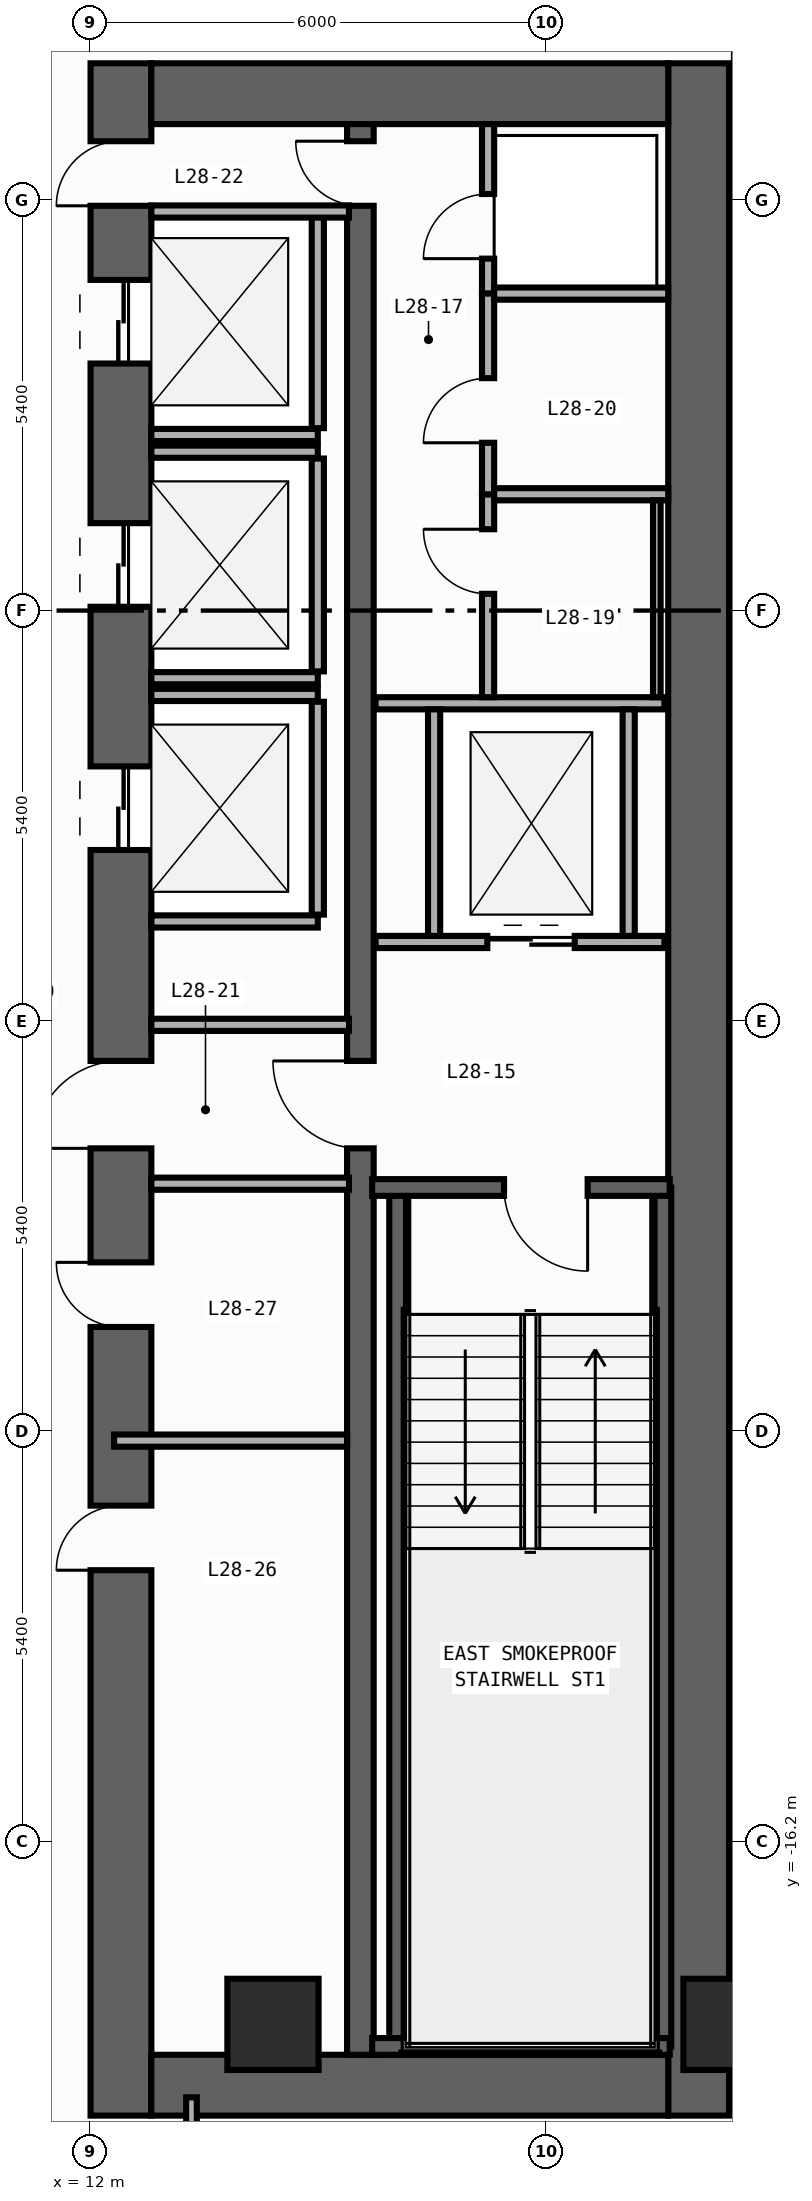
"""IFC4 building model, lengths in metres.
Left out: names, types, materials, properties, quantities, classifications, styles, units other than length and angle.
Written with IfcOpenShell. Run it as: python <this file> out.ifc"""

import sys

from ifc_helpers import new_model, si_unit, direction, frame, frame_2d, origin, origin_2d, place, context, subcontext, project, spatial, rectangle, extrude, element, fill, save


model = new_model("IFC4")
c1 = context("Model", 3, precision=1e-05, world=origin(), true_north=direction((0.0, 1.0)))
c2 = subcontext(c1, "Body", "Model", "MODEL_VIEW")
j1 = project(units=[si_unit("LENGTHUNIT", "METRE"), si_unit("PLANEANGLEUNIT", "RADIAN")], contexts=[c1])
p1 = place(None, origin())
s1 = spatial("IfcSite", under=j1, at=p1, CompositionType="ELEMENT")
p2 = place(p1, origin())
s2 = spatial("IfcBuilding", under=s1, at=p2, CompositionType="ELEMENT")
p3 = place(p2, frame((0.0, 0.0, 122.6)))
s3 = spatial("IfcBuildingStorey", under=s2, at=p3, CompositionType="ELEMENT", Elevation=122.6)
p4 = place(p3, frame((12.4, -19.8, 0.0), z_axis=(0.0, 0.0, 1.0), x_axis=(0.0, 1.0, 0.0)))
e1 = element("IfcWall", 1, at=p4, inside=s3, PredefinedType="SHEAR", context=c2, shape_type="SweptSolid", body=[
    extrude(rectangle(XDim=27.0, YDim=0.8, at=frame_2d((13.5, 0.0))), origin(), (0.0, 0.0, 1.0), 3.94),
])
p5 = place(p4, frame((23.05, 0.0, 0.0)))
e2 = element("IfcOpeningElement", 2, at=p5, cuts=e1, PredefinedType="OPENING", context=c2, shape_type="SweptSolid", body=[
    extrude(rectangle(XDim=1.1, YDim=2.2, at=frame_2d((0.55, 1.1))), frame((0.0, 0.41, 0.0), z_axis=(0.0, -1.0, 0.0), x_axis=(1.0, 0.0, 0.0)), (0.0, 0.0, 1.0), 0.82),
])
p6 = place(p4, frame((19.85, 0.0, 0.0)))
e3 = element("IfcOpeningElement", 3, at=p6, cuts=e1, PredefinedType="OPENING", context=c2, shape_type="SweptSolid", body=[
    extrude(rectangle(XDim=1.1, YDim=2.2, at=frame_2d((0.55, 1.1))), frame((0.0, 0.41, 0.0), z_axis=(0.0, -1.0, 0.0), x_axis=(1.0, 0.0, 0.0)), (0.0, 0.0, 1.0), 0.82),
])
p7 = place(p4, frame((16.65, 0.0, 0.0)))
e4 = element("IfcOpeningElement", 4, at=p7, cuts=e1, PredefinedType="OPENING", context=c2, shape_type="SweptSolid", body=[
    extrude(rectangle(XDim=1.1, YDim=2.2, at=frame_2d((0.55, 1.1))), frame((0.0, 0.41, 0.0), z_axis=(0.0, -1.0, 0.0), x_axis=(1.0, 0.0, 0.0)), (0.0, 0.0, 1.0), 0.82),
])
p8 = place(p4, frame((7.175, 0.0, 0.0)))
e5 = element("IfcOpeningElement", 5, at=p8, cuts=e1, PredefinedType="OPENING", context=c2, shape_type="SweptSolid", body=[
    extrude(rectangle(XDim=0.85, YDim=2.1, at=frame_2d((0.425, 1.05))), frame((0.0, 0.41, 0.0), z_axis=(0.0, -1.0, 0.0), x_axis=(1.0, 0.0, 0.0)), (0.0, 0.0, 1.0), 0.82),
])
p9 = place(p4, frame((10.375, 0.0, 0.0)))
e6 = element("IfcOpeningElement", 6, at=p9, cuts=e1, PredefinedType="OPENING", context=c2, shape_type="SweptSolid", body=[
    extrude(rectangle(XDim=0.85, YDim=2.1, at=frame_2d((0.425, 1.05))), frame((0.0, 0.41, 0.0), z_axis=(0.0, -1.0, 0.0), x_axis=(1.0, 0.0, 0.0)), (0.0, 0.0, 1.0), 0.82),
])
p10 = place(p4, frame((12.725, 0.0, 0.0)))
e7 = element("IfcOpeningElement", 7, at=p10, cuts=e1, PredefinedType="OPENING", context=c2, shape_type="SweptSolid", body=[
    extrude(rectangle(XDim=1.15, YDim=2.2, at=frame_2d((0.575, 1.1))), frame((0.0, 0.41, 0.0), z_axis=(0.0, -1.0, 0.0), x_axis=(1.0, 0.0, 0.0)), (0.0, 0.0, 1.0), 0.82),
])
p11 = place(p4, frame((25.125, 0.0, 0.0)))
e8 = element("IfcOpeningElement", 8, at=p11, cuts=e1, PredefinedType="OPENING", context=c2, shape_type="SweptSolid", body=[
    extrude(rectangle(XDim=0.85, YDim=2.1, at=frame_2d((0.425, 1.05))), frame((0.0, 0.41, 0.0), z_axis=(0.0, -1.0, 0.0), x_axis=(1.0, 0.0, 0.0)), (0.0, 0.0, 1.0), 0.82),
])
p12 = place(p3, frame((20.0, -19.8, 0.0), z_axis=(0.0, 0.0, 1.0), x_axis=(0.0, 1.0, 0.0)))
e9 = element("IfcWall", 9, at=p12, inside=s3, PredefinedType="SHEAR", context=c2, shape_type="SweptSolid", body=[
    extrude(rectangle(XDim=27.0, YDim=0.8, at=frame_2d((13.5, 0.0))), origin(), (0.0, 0.0, 1.0), 3.94),
])
for number, where, z_axis, x_axis in (
    (10, (12.8, -19.4, 0.0), (0.0, 0.0, 1.0), (1.0, 0.0, 0.0)),
    (11, (12.8, 6.8, 0.0), (0.0, 0.0, 1.0), (1.0, 0.0, 0.0)),
):
    element("IfcWall", number, at=place(p3, frame(where, z_axis=z_axis, x_axis=x_axis)), inside=s3, PredefinedType="SHEAR", context=c2, shape_type="SweptSolid", body=[
        extrude(rectangle(XDim=6.8, YDim=0.8, at=frame_2d((3.4, 0.0))), origin(), (0.0, 0.0, 1.0), 3.94),
    ])
p13 = place(p3, frame((15.55, -19.0, 0.0), z_axis=(0.0, 0.0, 1.0), x_axis=(0.0, 1.0, 0.0)))
e12 = element("IfcWall", 12, at=p13, inside=s3, PredefinedType="SHEAR", context=c2, shape_type="SweptSolid", body=[
    extrude(rectangle(XDim=25.4, YDim=0.35, at=frame_2d((12.7, 0.0))), origin(), (0.0, 0.0, 1.0), 3.94),
])
p14 = place(p13, frame((11.925, 0.0, 0.0)))
e13 = element("IfcOpeningElement", 13, at=p14, cuts=e12, PredefinedType="OPENING", context=c2, shape_type="SweptSolid", body=[
    extrude(rectangle(XDim=1.15, YDim=2.2, at=frame_2d((0.575, 1.1))), frame((0.0, 0.185, 0.0), z_axis=(0.0, -1.0, 0.0), x_axis=(1.0, 0.0, 0.0)), (0.0, 0.0, 1.0), 0.37),
])
p15 = place(p13, frame((24.325, 0.0, 0.0)))
e14 = element("IfcOpeningElement", 14, at=p15, cuts=e12, PredefinedType="OPENING", context=c2, shape_type="SweptSolid", body=[
    extrude(rectangle(XDim=0.85, YDim=2.1, at=frame_2d((0.425, 1.05))), frame((0.0, 0.185, 0.0), z_axis=(0.0, -1.0, 0.0), x_axis=(1.0, 0.0, 0.0)), (0.0, 0.0, 1.0), 0.37),
])
for number, where, z_axis, x_axis in (
    (15, (16.04, -18.89, 0.0), (0.0, 0.0, 1.0), (0.0, 1.0, 0.0)),
    (16, (19.53, -18.89, 0.0), (0.0, 0.0, 1.0), (0.0, 1.0, 0.0)),
):
    element("IfcWall", number, at=place(p3, frame(where, z_axis=z_axis, x_axis=x_axis)), inside=s3, PredefinedType="SHEAR", context=c2, shape_type="SweptSolid", body=[
        extrude(rectangle(XDim=11.3, YDim=0.22, at=frame_2d((5.65, 0.0))), origin(), (0.0, 0.0, 1.0), 3.94),
    ])
p16 = place(p3, frame((15.705, -18.89, 0.0), z_axis=(0.0, 0.0, 1.0), x_axis=(1.0, 0.0, 0.0)))
e17 = element("IfcWall", 17, at=p16, inside=s3, PredefinedType="SHEAR", context=c2, shape_type="SweptSolid", body=[
    extrude(rectangle(XDim=3.915, YDim=0.22, at=frame_2d((1.958, 0.0))), origin(), (0.0, 0.0, 1.0), 3.94),
])
p17 = place(p3, frame((19.62, -7.59, 0.0), z_axis=(0.0, 0.0, 1.0), x_axis=(-1.0, 0.0, 0.0)))
e18 = element("IfcWall", 18, at=p17, inside=s3, PredefinedType="SHEAR", context=c2, shape_type="SweptSolid", body=[
    extrude(rectangle(XDim=3.915, YDim=0.22, at=frame_2d((1.958, 0.0))), origin(), (0.0, 0.0, 1.0), 3.94),
])
p18 = place(p17, frame((1.08, 0.0, 0.0)))
e19 = element("IfcOpeningElement", 19, at=p18, cuts=e18, PredefinedType="OPENING", context=c2, shape_type="SweptSolid", body=[
    extrude(rectangle(XDim=1.1, YDim=2.2, at=frame_2d((0.55, 1.1))), frame((0.0, 0.12, 0.0), z_axis=(0.0, -1.0, 0.0), x_axis=(1.0, 0.0, 0.0)), (0.0, 0.0, 1.0), 0.24),
])
for number, where, z_axis, x_axis in (
    (20, (20.4, -18.6, 0.0), (0.0, 0.0, 1.0), (1.0, 0.0, 0.0)),
    (21, (14.4, -18.6, 0.0), (0.0, 0.0, 1.0), (1.0, 0.0, 0.0)),
):
    element("IfcColumn", number, at=place(p3, frame(where, z_axis=z_axis, x_axis=x_axis)), inside=s3, PredefinedType="COLUMN", context=c2, shape_type="SweptSolid", body=[
        extrude(rectangle(XDim=1.2, YDim=1.2, at=origin_2d()), origin(), (0.0, 0.0, 1.0), 4.2),
    ])
p19 = place(p3, frame((12.8, 2.31, 0.0), z_axis=(0.0, 0.0, 1.0), x_axis=(1.0, 0.0, 0.0)))
e22 = element("IfcWall", 22, at=p19, inside=s3, PredefinedType="STANDARD", context=c2, shape_type="SweptSolid", body=[
    extrude(rectangle(XDim=2.19, YDim=0.16, at=frame_2d((1.095, 0.0))), origin(), (0.0, 0.0, 1.0), 3.94),
])
p20 = place(p3, frame((14.99, 2.4, 0.0), z_axis=(0.0, 0.0, 1.0), x_axis=(0.0, 1.0, 0.0)))
e23 = element("IfcWall", 23, at=p20, inside=s3, PredefinedType="STANDARD", context=c2, shape_type="SweptSolid", body=[
    extrude(rectangle(XDim=2.8, YDim=0.16, at=frame_2d((1.4, 0.0))), origin(), (0.0, 0.0, 1.0), 3.94),
])
for number, where, z_axis, x_axis in (
    (24, (12.8, -0.89, 0.0), (0.0, 0.0, 1.0), (1.0, 0.0, 0.0)),
    (25, (12.8, 2.09, 0.0), (0.0, 0.0, 1.0), (1.0, 0.0, 0.0)),
):
    element("IfcWall", number, at=place(p3, frame(where, z_axis=z_axis, x_axis=x_axis)), inside=s3, PredefinedType="STANDARD", context=c2, shape_type="SweptSolid", body=[
        extrude(rectangle(XDim=2.19, YDim=0.16, at=frame_2d((1.095, 0.0))), origin(), (0.0, 0.0, 1.0), 3.94),
    ])
p21 = place(p3, frame((14.99, -0.8, 0.0), z_axis=(0.0, 0.0, 1.0), x_axis=(0.0, 1.0, 0.0)))
e26 = element("IfcWall", 26, at=p21, inside=s3, PredefinedType="STANDARD", context=c2, shape_type="SweptSolid", body=[
    extrude(rectangle(XDim=2.8, YDim=0.16, at=frame_2d((1.4, 0.0))), origin(), (0.0, 0.0, 1.0), 3.94),
])
for number, where, z_axis, x_axis in (
    (27, (12.8, -4.09, 0.0), (0.0, 0.0, 1.0), (1.0, 0.0, 0.0)),
    (28, (12.8, -1.11, 0.0), (0.0, 0.0, 1.0), (1.0, 0.0, 0.0)),
):
    element("IfcWall", number, at=place(p3, frame(where, z_axis=z_axis, x_axis=x_axis)), inside=s3, PredefinedType="STANDARD", context=c2, shape_type="SweptSolid", body=[
        extrude(rectangle(XDim=2.19, YDim=0.16, at=frame_2d((1.095, 0.0))), origin(), (0.0, 0.0, 1.0), 3.94),
    ])
p22 = place(p3, frame((14.99, -4.0, 0.0), z_axis=(0.0, 0.0, 1.0), x_axis=(0.0, 1.0, 0.0)))
e29 = element("IfcWall", 29, at=p22, inside=s3, PredefinedType="STANDARD", context=c2, shape_type="SweptSolid", body=[
    extrude(rectangle(XDim=2.8, YDim=0.16, at=frame_2d((1.4, 0.0))), origin(), (0.0, 0.0, 1.0), 3.94),
])
p23 = place(p3, frame((15.75, -4.36, 0.0), z_axis=(0.0, 0.0, 1.0), x_axis=(1.0, 0.0, 0.0)))
e30 = element("IfcWall", 30, at=p23, inside=s3, PredefinedType="STANDARD", context=c2, shape_type="SweptSolid", body=[
    extrude(rectangle(XDim=3.8, YDim=0.16, at=frame_2d((1.9, 0.0))), origin(), (0.0, 0.0, 1.0), 3.94),
])
p24 = place(p23, frame((1.47, 0.0, 0.0)))
e31 = element("IfcOpeningElement", 31, at=p24, cuts=e30, PredefinedType="OPENING", context=c2, shape_type="SweptSolid", body=[
    extrude(rectangle(XDim=1.15, YDim=2.2, at=frame_2d((0.575, 1.1))), frame((0.0, 0.09, 0.0), z_axis=(0.0, -1.0, 0.0), x_axis=(1.0, 0.0, 0.0)), (0.0, 0.0, 1.0), 0.18),
])
p25 = place(p3, frame((15.75, -1.22, 0.0), z_axis=(0.0, 0.0, 1.0), x_axis=(1.0, 0.0, 0.0)))
e32 = element("IfcWall", 32, at=p25, inside=s3, PredefinedType="STANDARD", context=c2, shape_type="SweptSolid", body=[
    extrude(rectangle(XDim=3.8, YDim=0.16, at=frame_2d((1.9, 0.0))), origin(), (0.0, 0.0, 1.0), 3.94),
])
for number, where, z_axis, x_axis in (
    (33, (16.52, -4.28, 0.0), (0.0, 0.0, 1.0), (0.0, 1.0, 0.0)),
    (34, (19.08, -4.28, 0.0), (0.0, 0.0, 1.0), (0.0, 1.0, 0.0)),
):
    element("IfcWall", number, at=place(p3, frame(where, z_axis=z_axis, x_axis=x_axis)), inside=s3, PredefinedType="STANDARD", context=c2, shape_type="SweptSolid", body=[
        extrude(rectangle(XDim=2.98, YDim=0.16, at=frame_2d((1.49, 0.0))), origin(), (0.0, 0.0, 1.0), 3.94),
    ])
for number, where, z_axis, x_axis in (
    (35, (12.8, -5.45, 0.0), (0.0, 0.0, 1.0), (1.0, 0.0, 0.0)),
    (36, (12.8, -7.54, 0.0), (0.0, 0.0, 1.0), (1.0, 0.0, 0.0)),
    (37, (12.8, 5.25, 0.0), (0.0, 0.0, 1.0), (1.0, 0.0, 0.0)),
):
    element("IfcWall", number, at=place(p3, frame(where, z_axis=z_axis, x_axis=x_axis)), inside=s3, PredefinedType="STANDARD", context=c2, shape_type="SweptSolid", body=[
        extrude(rectangle(XDim=2.6, YDim=0.16, at=frame_2d((1.3, 0.0))), origin(), (0.0, 0.0, 1.0), 3.94),
    ])
p26 = place(p3, frame((17.23, 4.17, 0.0), z_axis=(0.0, 0.0, 1.0), x_axis=(0.0, 1.0, 0.0)))
e38 = element("IfcWall", 38, at=p26, inside=s3, PredefinedType="PARTITIONING", context=c2, shape_type="SweptSolid", body=[
    extrude(rectangle(XDim=2.23, YDim=0.16, at=frame_2d((1.115, 0.0))), origin(), (0.0, 0.0, 1.0), 3.94),
])
p27 = place(p26, frame((0.46, 0.0, 0.0)))
e39 = element("IfcOpeningElement", 39, at=p27, cuts=e38, PredefinedType="OPENING", context=c2, shape_type="SweptSolid", body=[
    extrude(rectangle(XDim=0.85, YDim=2.1, at=frame_2d((0.425, 1.05))), frame((0.0, 0.09, 0.0), z_axis=(0.0, -1.0, 0.0), x_axis=(1.0, 0.0, 0.0)), (0.0, 0.0, 1.0), 0.18),
])
p28 = place(p3, frame((17.23, -1.14, 0.0), z_axis=(0.0, 0.0, 1.0), x_axis=(0.0, 1.0, 0.0)))
e40 = element("IfcWall", 40, at=p28, inside=s3, PredefinedType="PARTITIONING", context=c2, shape_type="SweptSolid", body=[
    extrude(rectangle(XDim=2.67, YDim=0.16, at=frame_2d((1.335, 0.0))), origin(), (0.0, 0.0, 1.0), 3.94),
])
p29 = place(p28, frame((1.36, 0.0, 0.0)))
e41 = element("IfcOpeningElement", 41, at=p29, cuts=e40, PredefinedType="OPENING", context=c2, shape_type="SweptSolid", body=[
    extrude(rectangle(XDim=0.85, YDim=2.1, at=frame_2d((0.425, 1.05))), frame((0.0, 0.09, 0.0), z_axis=(0.0, -1.0, 0.0), x_axis=(1.0, 0.0, 0.0)), (0.0, 0.0, 1.0), 0.18),
])
p30 = place(p3, frame((17.23, 1.53, 0.0), z_axis=(0.0, 0.0, 1.0), x_axis=(0.0, 1.0, 0.0)))
e42 = element("IfcWall", 42, at=p30, inside=s3, PredefinedType="PARTITIONING", context=c2, shape_type="SweptSolid", body=[
    extrude(rectangle(XDim=2.64, YDim=0.16, at=frame_2d((1.32, 0.0))), origin(), (0.0, 0.0, 1.0), 3.94),
])
p31 = place(p30, frame((0.677, 0.0, 0.0)))
e43 = element("IfcOpeningElement", 43, at=p31, cuts=e42, PredefinedType="OPENING", context=c2, shape_type="SweptSolid", body=[
    extrude(rectangle(XDim=0.85, YDim=2.1, at=frame_2d((0.425, 1.05))), frame((0.0, 0.09, 0.0), z_axis=(0.0, -1.0, 0.0), x_axis=(1.0, 0.0, 0.0)), (0.0, 0.0, 1.0), 0.18),
])
for number, where, z_axis, x_axis in (
    (44, (17.31, 4.17, 0.0), (0.0, 0.0, 1.0), (1.0, 0.0, 0.0)),
    (45, (17.31, 1.53, 0.0), (0.0, 0.0, 1.0), (1.0, 0.0, 0.0)),
):
    element("IfcWall", number, at=place(p3, frame(where, z_axis=z_axis, x_axis=x_axis)), inside=s3, PredefinedType="PARTITIONING", context=c2, shape_type="SweptSolid", body=[
        extrude(rectangle(XDim=2.29, YDim=0.16, at=frame_2d((1.145, 0.0))), origin(), (0.0, 0.0, 1.0), 3.94),
    ])
p32 = place(p3, frame((12.31, -10.92, 0.0), z_axis=(0.0, 0.0, 1.0), x_axis=(1.0, 0.0, 0.0)))
e46 = element("IfcWall", 46, at=p32, inside=s3, PredefinedType="PARTITIONING", context=c2, shape_type="SweptSolid", body=[
    extrude(rectangle(XDim=3.065, YDim=0.16, at=frame_2d((1.532, 0.0))), origin(), (0.0, 0.0, 1.0), 3.24),
])
p33 = place(p3, frame((13.328, -26.001, 0.0), z_axis=(0.0, 0.0, 1.0), x_axis=(0.0, 1.0, 0.0)))
e47 = element("IfcWall", 47, at=p33, inside=s3, PredefinedType="PARTITIONING", context=c2, shape_type="SweptSolid", body=[
    extrude(rectangle(XDim=6.441, YDim=0.14, at=frame_2d((3.221, 0.0))), origin(), (0.0, 0.0, 1.0), 3.94),
])
p34 = place(p33, frame((3.913, 0.0, 0.0)))
e48 = element("IfcOpeningElement", 48, at=p34, cuts=e47, PredefinedType="OPENING", context=c2, shape_type="SweptSolid", body=[
    extrude(rectangle(XDim=0.85, YDim=2.1, at=frame_2d((0.425, 1.05))), frame((0.0, 0.08, 0.0), z_axis=(0.0, -1.0, 0.0), x_axis=(1.0, 0.0, 0.0)), (0.0, 0.0, 1.0), 0.16),
])
p35 = place(p3, frame((19.45, 1.45, 0.0), z_axis=(0.0, 0.0, 1.0), x_axis=(0.0, -1.0, 0.0)))
e49 = element("IfcWall", 49, at=p35, inside=s3, PredefinedType="PARTITIONING", context=c2, shape_type="SweptSolid", body=[
    extrude(rectangle(XDim=2.59, YDim=0.1, at=frame_2d((1.295, 0.0))), origin(), (0.0, 0.0, 1.0), 3.94),
])
p36 = place(p18, origin())
e50 = element("IfcDoor", 50, at=p36, inside=s3, OperationType="SINGLE_SWING_LEFT", PredefinedType="DOOR", context=c2, shape_type="SweptSolid", body=[
    extrude(rectangle(XDim=1.1, YDim=2.2, at=frame_2d((0.55, 1.1))), frame((0.0, 0.025, 0.0), z_axis=(0.0, -1.0, 0.0), x_axis=(1.0, 0.0, 0.0)), (0.0, 0.0, 1.0), 0.05),
])
fill(e19, e50)
p37 = place(p5, origin())
e51 = element("IfcDoor", 51, at=p37, inside=s3, OperationType="DOUBLE_DOOR_SLIDING", PredefinedType="DOOR", context=c2, shape_type="SweptSolid", body=[
    extrude(rectangle(XDim=1.1, YDim=2.2, at=frame_2d((0.55, 1.1))), frame((0.0, 0.025, 0.0), z_axis=(0.0, -1.0, 0.0), x_axis=(1.0, 0.0, 0.0)), (0.0, 0.0, 1.0), 0.05),
])
fill(e2, e51)
p38 = place(p6, origin())
e52 = element("IfcDoor", 52, at=p38, inside=s3, OperationType="DOUBLE_DOOR_SLIDING", PredefinedType="DOOR", context=c2, shape_type="SweptSolid", body=[
    extrude(rectangle(XDim=1.1, YDim=2.2, at=frame_2d((0.55, 1.1))), frame((0.0, 0.025, 0.0), z_axis=(0.0, -1.0, 0.0), x_axis=(1.0, 0.0, 0.0)), (0.0, 0.0, 1.0), 0.05),
])
fill(e3, e52)
p39 = place(p7, origin())
e53 = element("IfcDoor", 53, at=p39, inside=s3, OperationType="DOUBLE_DOOR_SLIDING", PredefinedType="DOOR", context=c2, shape_type="SweptSolid", body=[
    extrude(rectangle(XDim=1.1, YDim=2.2, at=frame_2d((0.55, 1.1))), frame((0.0, 0.025, 0.0), z_axis=(0.0, -1.0, 0.0), x_axis=(1.0, 0.0, 0.0)), (0.0, 0.0, 1.0), 0.05),
])
fill(e4, e53)
p40 = place(p8, origin())
e54 = element("IfcDoor", 54, at=p40, inside=s3, OperationType="SINGLE_SWING_LEFT", PredefinedType="DOOR", context=c2, shape_type="SweptSolid", body=[
    extrude(rectangle(XDim=0.85, YDim=2.1, at=frame_2d((0.425, 1.05))), frame((0.0, 0.025, 0.0), z_axis=(0.0, -1.0, 0.0), x_axis=(1.0, 0.0, 0.0)), (0.0, 0.0, 1.0), 0.05),
])
fill(e5, e54)
p41 = place(p9, origin())
e55 = element("IfcDoor", 55, at=p41, inside=s3, OperationType="SINGLE_SWING_RIGHT", PredefinedType="DOOR", context=c2, shape_type="SweptSolid", body=[
    extrude(rectangle(XDim=0.85, YDim=2.1, at=frame_2d((0.425, 1.05))), frame((0.0, 0.025, 0.0), z_axis=(0.0, -1.0, 0.0), x_axis=(1.0, 0.0, 0.0)), (0.0, 0.0, 1.0), 0.05),
])
fill(e6, e55)
p42 = place(p10, origin())
e56 = element("IfcDoor", 56, at=p42, inside=s3, OperationType="SINGLE_SWING_LEFT", PredefinedType="DOOR", context=c2, shape_type="SweptSolid", body=[
    extrude(rectangle(XDim=1.15, YDim=2.2, at=frame_2d((0.575, 1.1))), frame((0.0, 0.025, 0.0), z_axis=(0.0, -1.0, 0.0), x_axis=(1.0, 0.0, 0.0)), (0.0, 0.0, 1.0), 0.05),
])
fill(e7, e56)
p43 = place(p14, origin())
e57 = element("IfcDoor", 57, at=p43, inside=s3, OperationType="SINGLE_SWING_RIGHT", PredefinedType="DOOR", context=c2, shape_type="SweptSolid", body=[
    extrude(rectangle(XDim=1.15, YDim=2.2, at=frame_2d((0.575, 1.1))), frame((0.0, 0.025, 0.0), z_axis=(0.0, -1.0, 0.0), x_axis=(1.0, 0.0, 0.0)), (0.0, 0.0, 1.0), 0.05),
])
fill(e13, e57)
p44 = place(p11, origin())
e58 = element("IfcDoor", 58, at=p44, inside=s3, OperationType="SINGLE_SWING_LEFT", PredefinedType="DOOR", context=c2, shape_type="SweptSolid", body=[
    extrude(rectangle(XDim=0.85, YDim=2.1, at=frame_2d((0.425, 1.05))), frame((0.0, 0.025, 0.0), z_axis=(0.0, -1.0, 0.0), x_axis=(1.0, 0.0, 0.0)), (0.0, 0.0, 1.0), 0.05),
])
fill(e8, e58)
p45 = place(p15, origin())
e59 = element("IfcDoor", 59, at=p45, inside=s3, OperationType="SINGLE_SWING_RIGHT", PredefinedType="DOOR", context=c2, shape_type="SweptSolid", body=[
    extrude(rectangle(XDim=0.85, YDim=2.1, at=frame_2d((0.425, 1.05))), frame((0.0, 0.025, 0.0), z_axis=(0.0, -1.0, 0.0), x_axis=(1.0, 0.0, 0.0)), (0.0, 0.0, 1.0), 0.05),
])
fill(e14, e59)
p46 = place(p24, origin())
e60 = element("IfcDoor", 60, at=p46, inside=s3, OperationType="DOUBLE_DOOR_SLIDING", PredefinedType="DOOR", context=c2, shape_type="SweptSolid", body=[
    extrude(rectangle(XDim=1.15, YDim=2.2, at=frame_2d((0.575, 1.1))), frame((0.0, 0.025, 0.0), z_axis=(0.0, -1.0, 0.0), x_axis=(1.0, 0.0, 0.0)), (0.0, 0.0, 1.0), 0.05),
])
fill(e31, e60)
p47 = place(p27, origin())
e61 = element("IfcDoor", 61, at=p47, inside=s3, OperationType="SINGLE_SWING_LEFT", PredefinedType="DOOR", context=c2, shape_type="SweptSolid", body=[
    extrude(rectangle(XDim=0.85, YDim=2.1, at=frame_2d((0.425, 1.05))), frame((0.0, 0.025, 0.0), z_axis=(0.0, -1.0, 0.0), x_axis=(1.0, 0.0, 0.0)), (0.0, 0.0, 1.0), 0.05),
])
fill(e39, e61)
p48 = place(p29, origin())
e62 = element("IfcDoor", 62, at=p48, inside=s3, OperationType="SINGLE_SWING_RIGHT", PredefinedType="DOOR", context=c2, shape_type="SweptSolid", body=[
    extrude(rectangle(XDim=0.85, YDim=2.1, at=frame_2d((0.425, 1.05))), frame((0.0, 0.025, 0.0), z_axis=(0.0, -1.0, 0.0), x_axis=(1.0, 0.0, 0.0)), (0.0, 0.0, 1.0), 0.05),
])
fill(e41, e62)
p49 = place(p31, origin())
e63 = element("IfcDoor", 63, at=p49, inside=s3, OperationType="SINGLE_SWING_LEFT", PredefinedType="DOOR", context=c2, shape_type="SweptSolid", body=[
    extrude(rectangle(XDim=0.85, YDim=2.1, at=frame_2d((0.425, 1.05))), frame((0.0, 0.025, 0.0), z_axis=(0.0, -1.0, 0.0), x_axis=(1.0, 0.0, 0.0)), (0.0, 0.0, 1.0), 0.05),
])
fill(e43, e63)
save(model, sys.argv[1])
